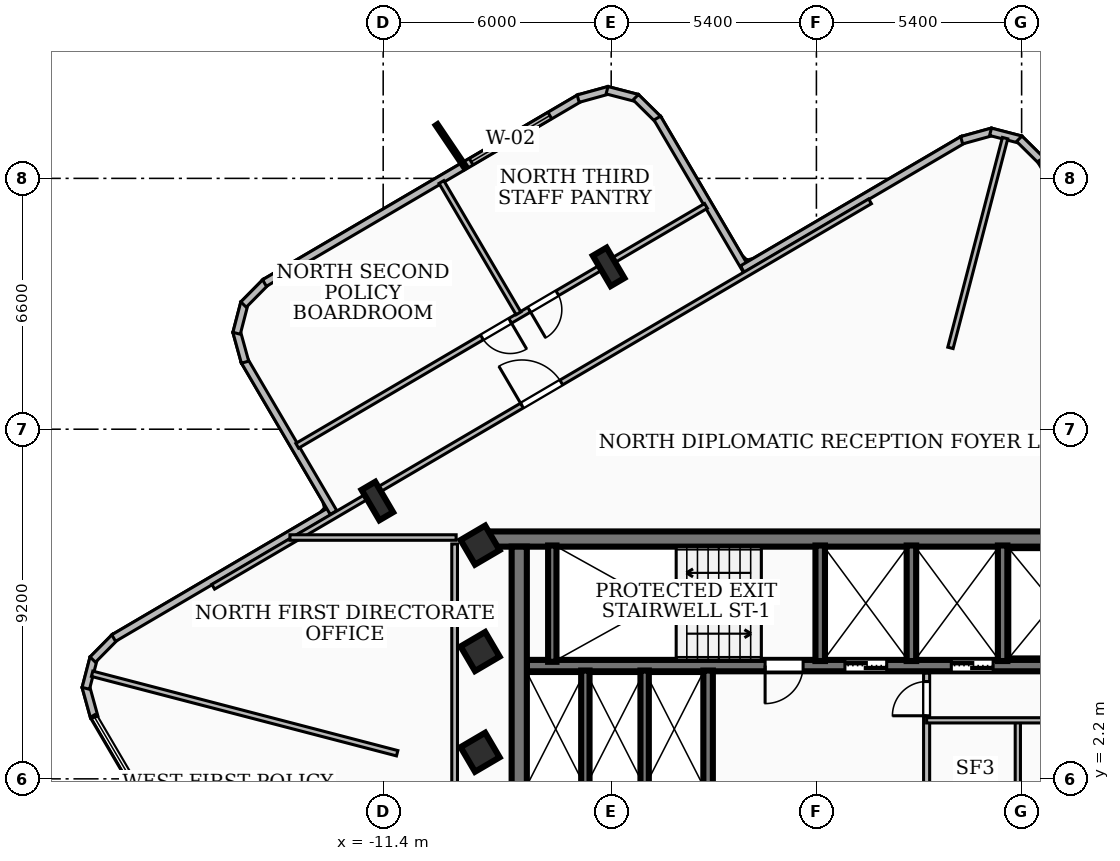
"""IFC4 building model, lengths in metres.
Left out: names, types, materials, properties, quantities, classifications, styles, units other than length and angle.
Written with IfcOpenShell. Run it as: python <this file> out.ifc"""

import sys

from ifc_helpers import new_model, si_unit, direction, frame, frame_2d, origin, origin_2d, place, context, subcontext, project, spatial, rectangle, i_section, extrude, element, fill, save


model = new_model("IFC4")
c1 = context("Model", 3, precision=1e-05, world=origin(), true_north=direction((0.0, 1.0)))
c2 = subcontext(c1, "Body", "Model", "MODEL_VIEW")
j1 = project(units=[si_unit("LENGTHUNIT", "METRE"), si_unit("PLANEANGLEUNIT", "RADIAN")], contexts=[c1])
p1 = place(None, origin())
s1 = spatial("IfcSite", under=j1, at=p1, CompositionType="ELEMENT")
p2 = place(p1, origin())
s2 = spatial("IfcBuilding", under=s1, at=p2, CompositionType="ELEMENT")
p3 = place(p2, frame((0.0, 0.0, 208.62)))
s3 = spatial("IfcBuildingStorey", under=s2, at=p3, CompositionType="ELEMENT", Elevation=208.62)
p4 = place(p3, frame((-8.78, 8.51, 0.0), z_axis=(0.0, 0.0, 1.0), x_axis=(1.0, 0.0, 0.0)))
e1 = element("IfcWall", 1, at=p4, inside=s3, PredefinedType="SHEAR", context=c2, shape_type="SweptSolid", body=[
    extrude(rectangle(XDim=17.56, YDim=0.4, at=frame_2d((8.78, 0.0))), origin(), (0.0, 0.0, 1.0), 3.16),
])
p5 = place(p3, frame((-7.82, 1.95, 0.0), z_axis=(0.0, 0.0, 1.0), x_axis=(0.0, 1.0, 0.0)))
e2 = element("IfcWall", 2, at=p5, inside=s3, PredefinedType="SHEAR", context=c2, shape_type="SweptSolid", body=[
    extrude(rectangle(XDim=6.36, YDim=0.4, at=frame_2d((3.18, 0.0))), origin(), (0.0, 0.0, 1.0), 3.16),
])
p6 = place(p3, frame((7.62, 5.18, 0.0), z_axis=(0.0, 0.0, 1.0), x_axis=(-1.0, 0.0, 0.0)))
e3 = element("IfcWall", 3, at=p6, inside=s3, PredefinedType="SOLIDWALL", context=c2, shape_type="SweptSolid", body=[
    extrude(rectangle(XDim=15.24, YDim=0.3, at=frame_2d((7.62, 0.0))), origin(), (0.0, 0.0, 1.0), 3.16),
])
p7 = place(p6, frame((5.77, 0.0, 0.0)))
e4 = element("IfcOpeningElement", 4, at=p7, cuts=e3, PredefinedType="OPENING", context=c2, shape_type="SweptSolid", body=[
    extrude(rectangle(XDim=1.1, YDim=2.15, at=frame_2d((0.55, 1.075))), frame((0.0, 0.16, 0.0), z_axis=(0.0, -1.0, 0.0), x_axis=(1.0, 0.0, 0.0)), (0.0, 0.0, 1.0), 0.32),
])
p8 = place(p6, frame((2.97, 0.0, 0.0)))
e5 = element("IfcOpeningElement", 5, at=p8, cuts=e3, PredefinedType="OPENING", context=c2, shape_type="SweptSolid", body=[
    extrude(rectangle(XDim=1.1, YDim=2.15, at=frame_2d((0.55, 1.075))), frame((0.0, 0.16, 0.0), z_axis=(0.0, -1.0, 0.0), x_axis=(1.0, 0.0, 0.0)), (0.0, 0.0, 1.0), 0.32),
])
p9 = place(p6, frame((7.97, 0.0, 0.0)))
e6 = element("IfcOpeningElement", 6, at=p9, cuts=e3, PredefinedType="OPENING", context=c2, shape_type="SweptSolid", body=[
    extrude(rectangle(XDim=1.0, YDim=2.1, at=frame_2d((0.5, 1.05))), frame((0.0, 0.16, 0.0), z_axis=(0.0, -1.0, 0.0), x_axis=(1.0, 0.0, 0.0)), (0.0, 0.0, 1.0), 0.32),
])
p10 = place(p3, frame((-6.95, 5.28, 0.0), z_axis=(0.0, 0.0, 1.0), x_axis=(0.0, 1.0, 0.0)))
e7 = element("IfcWall", 7, at=p10, inside=s3, PredefinedType="SOLIDWALL", context=c2, shape_type="SweptSolid", body=[
    extrude(rectangle(XDim=3.06, YDim=0.22, at=frame_2d((1.53, 0.0))), origin(), (0.0, 0.0, 1.0), 3.16),
])
for number, where, z_axis, x_axis in (
    (8, (0.1, 5.3, 0.0), (0.0, 0.0, 1.0), (0.0, 1.0, 0.0)),
    (9, (2.5, 5.3, 0.0), (0.0, 0.0, 1.0), (0.0, 1.0, 0.0)),
    (10, (4.9, 5.3, 0.0), (0.0, 0.0, 1.0), (0.0, 1.0, 0.0)),
):
    element("IfcWall", number, at=place(p3, frame(where, z_axis=z_axis, x_axis=x_axis)), inside=s3, PredefinedType="SOLIDWALL", context=c2, shape_type="SweptSolid", body=[
        extrude(rectangle(XDim=3.04, YDim=0.25, at=frame_2d((1.52, 0.0))), origin(), (0.0, 0.0, 1.0), 3.16),
    ])
p11 = place(p3, frame((-2.85, 1.98, 0.0), z_axis=(0.0, 0.0, 1.0), x_axis=(0.0, 1.0, 0.0)))
e11 = element("IfcWall", 11, at=p11, inside=s3, PredefinedType="SOLIDWALL", context=c2, shape_type="SweptSolid", body=[
    extrude(rectangle(XDim=3.07, YDim=0.25, at=frame_2d((1.535, 0.0))), origin(), (0.0, 0.0, 1.0), 3.16),
])
for number, where, z_axis, x_axis in (
    (12, (-6.08, 1.98, 0.0), (0.0, 0.0, 1.0), (0.0, 1.0, 0.0)),
    (13, (-4.52, 1.98, 0.0), (0.0, 0.0, 1.0), (0.0, 1.0, 0.0)),
):
    element("IfcWall", number, at=place(p3, frame(where, z_axis=z_axis, x_axis=x_axis)), inside=s3, PredefinedType="SOLIDWALL", context=c2, shape_type="SweptSolid", body=[
        extrude(rectangle(XDim=3.07, YDim=0.22, at=frame_2d((1.535, 0.0))), origin(), (0.0, 0.0, 1.0), 3.16),
    ])
for number, where, z_axis, x_axis in (
    (14, (-8.85, 2.9, 0.0), (0.0, 0.0, 1.0), (0.863, 0.506, 0.0)),
    (15, (-8.85, 5.55, 0.0), (0.0, 0.0, 1.0), (0.863, 0.506, 0.0)),
    (16, (-8.85, 8.35, 0.0), (0.0, 0.0, 1.0), (0.863, 0.506, 0.0)),
):
    element("IfcColumn", number, at=place(p3, frame(where, z_axis=z_axis, x_axis=x_axis)), inside=s3, PredefinedType="COLUMN", context=c2, shape_type="SweptSolid", body=[
        extrude(rectangle(XDim=0.75, YDim=0.75, at=origin_2d()), origin(), (0.0, 0.0, 1.0), 3.42),
    ])
for number, where, z_axis, x_axis in (
    (17, (-5.468, 15.671, 0.0), (0.0, 0.0, 1.0), (0.863, 0.506, 0.0)),
    (18, (-11.554, 9.51, 0.0), (0.0, 0.0, 1.0), (0.863, 0.506, 0.0)),
):
    element("IfcColumn", number, at=place(p3, frame(where, z_axis=z_axis, x_axis=x_axis)), inside=s3, PredefinedType="COLUMN", context=c2, shape_type="SweptSolid", body=[
        extrude(i_section(OverallWidth=0.418, OverallDepth=0.927, WebThickness=0.019, FlangeThickness=0.032, at=origin_2d()), origin(), (0.0, 0.0, 1.0), 3.42),
    ])
p12 = place(p3, frame((-19.003, 3.822, 0.0), z_axis=(0.0, 0.0, 1.0), x_axis=(-0.266246353668, 0.963905015631, 0.0)))
e19 = element("IfcWall", 19, at=p12, inside=s3, PredefinedType="SOLIDWALL", context=c2, shape_type="SweptSolid", body=[
    extrude(rectangle(XDim=0.838, YDim=0.2, at=frame_2d((0.419, 0.0))), origin(), (0.0, 0.0, 1.0), 3.16),
])
p13 = place(p3, frame((-19.225, 4.582, 0.0), z_axis=(0.0, 0.0, 1.0), x_axis=(0.251167733737, 0.967943577658, 0.0)))
e20 = element("IfcWall", 20, at=p13, inside=s3, PredefinedType="SOLIDWALL", context=c2, shape_type="SweptSolid", body=[
    extrude(rectangle(XDim=0.824, YDim=0.2, at=frame_2d((0.412, 0.0))), origin(), (0.0, 0.0, 1.0), 3.16),
])
p14 = place(p3, frame((-19.042, 5.338, 0.0), z_axis=(0.0, 0.0, 1.0), x_axis=(0.702877524881, 0.711310891957, 0.0)))
e21 = element("IfcWall", 21, at=p14, inside=s3, PredefinedType="SOLIDWALL", context=c2, shape_type="SweptSolid", body=[
    extrude(rectangle(XDim=0.84, YDim=0.2, at=frame_2d((0.42, 0.0))), origin(), (0.0, 0.0, 1.0), 3.16),
])
p15 = place(p3, frame((-18.492, 5.904, 0.0), z_axis=(0.0, 0.0, 1.0), x_axis=(0.86245977502, 0.506125613333, 0.0)))
e22 = element("IfcWall", 22, at=p15, inside=s3, PredefinedType="SOLIDWALL", context=c2, shape_type="SweptSolid", body=[
    extrude(rectangle(XDim=6.741, YDim=0.2, at=frame_2d((3.371, 0.0))), origin(), (0.0, 0.0, 1.0), 3.16),
])
p16 = place(p3, frame((-12.707, 9.207, 0.0), z_axis=(0.0, 0.0, 1.0), x_axis=(-0.505936854923, 0.862570518178, 0.0)))
e23 = element("IfcWall", 23, at=p16, inside=s3, PredefinedType="SOLIDWALL", context=c2, shape_type="SweptSolid", body=[
    extrude(rectangle(XDim=4.641, YDim=0.2, at=frame_2d((2.32, 0.0))), origin(), (0.0, 0.0, 1.0), 3.16),
])
p17 = place(p3, frame((-15.035, 13.164, 0.0), z_axis=(0.0, 0.0, 1.0), x_axis=(-0.266246353668, 0.963905015631, 0.0)))
e24 = element("IfcWall", 24, at=p17, inside=s3, PredefinedType="SOLIDWALL", context=c2, shape_type="SweptSolid", body=[
    extrude(rectangle(XDim=0.838, YDim=0.2, at=frame_2d((0.419, 0.0))), origin(), (0.0, 0.0, 1.0), 3.16),
])
p18 = place(p3, frame((-15.257, 13.924, 0.0), z_axis=(0.0, 0.0, 1.0), x_axis=(0.251167733737, 0.967943577658, 0.0)))
e25 = element("IfcWall", 25, at=p18, inside=s3, PredefinedType="SOLIDWALL", context=c2, shape_type="SweptSolid", body=[
    extrude(rectangle(XDim=0.824, YDim=0.2, at=frame_2d((0.412, 0.0))), origin(), (0.0, 0.0, 1.0), 3.16),
])
p19 = place(p3, frame((-15.074, 14.68, 0.0), z_axis=(0.0, 0.0, 1.0), x_axis=(0.702877524881, 0.711310891957, 0.0)))
e26 = element("IfcWall", 26, at=p19, inside=s3, PredefinedType="SOLIDWALL", context=c2, shape_type="SweptSolid", body=[
    extrude(rectangle(XDim=0.84, YDim=0.2, at=frame_2d((0.42, 0.0))), origin(), (0.0, 0.0, 1.0), 3.16),
])
p20 = place(p3, frame((-14.524, 15.246, 0.0), z_axis=(0.0, 0.0, 1.0), x_axis=(0.862483422861, 0.506085314241, 0.0)))
e27 = element("IfcWall", 27, at=p20, inside=s3, PredefinedType="SOLIDWALL", context=c2, shape_type="SweptSolid", body=[
    extrude(rectangle(XDim=9.625, YDim=0.2, at=frame_2d((4.812, 0.0))), origin(), (0.0, 0.0, 1.0), 3.16),
])
p21 = place(p20, frame((6.307, 0.0, 0.85)))
e28 = element("IfcOpeningElement", 28, at=p21, cuts=e27, PredefinedType="OPENING", context=c2, shape_type="SweptSolid", body=[
    extrude(rectangle(XDim=2.4, YDim=2.1, at=frame_2d((1.2, 1.05))), frame((0.0, 0.11, 0.0), z_axis=(0.0, -1.0, 0.0), x_axis=(1.0, 0.0, 0.0)), (0.0, 0.0, 1.0), 0.22),
])
p22 = place(p3, frame((-6.269, 20.097, 0.0), z_axis=(0.0, 0.0, 1.0), x_axis=(0.963925656212, 0.266171616247, 0.0)))
e29 = element("IfcWall", 29, at=p22, inside=s3, PredefinedType="SOLIDWALL", context=c2, shape_type="SweptSolid", body=[
    extrude(rectangle(XDim=0.838, YDim=0.2, at=frame_2d((0.419, 0.0))), origin(), (0.0, 0.0, 1.0), 3.16),
])
p23 = place(p3, frame((-5.509, 20.319, 0.0), z_axis=(0.0, 0.0, 1.0), x_axis=(0.967962254737, -0.251095745493, 0.0)))
e30 = element("IfcWall", 30, at=p23, inside=s3, PredefinedType="SOLIDWALL", context=c2, shape_type="SweptSolid", body=[
    extrude(rectangle(XDim=0.824, YDim=0.2, at=frame_2d((0.412, 0.0))), origin(), (0.0, 0.0, 1.0), 3.16),
])
p24 = place(p3, frame((-4.753, 20.136, 0.0), z_axis=(0.0, 0.0, 1.0), x_axis=(0.711167178618, -0.70302293281, 0.0)))
e31 = element("IfcWall", 31, at=p24, inside=s3, PredefinedType="SOLIDWALL", context=c2, shape_type="SweptSolid", body=[
    extrude(rectangle(XDim=0.839, YDim=0.2, at=frame_2d((0.42, 0.0))), origin(), (0.0, 0.0, 1.0), 3.16),
])
p25 = place(p3, frame((-4.187, 19.586, 0.0), z_axis=(0.0, 0.0, 1.0), x_axis=(0.505936854923, -0.862570518178, 0.0)))
e32 = element("IfcWall", 32, at=p25, inside=s3, PredefinedType="SOLIDWALL", context=c2, shape_type="SweptSolid", body=[
    extrude(rectangle(XDim=4.641, YDim=0.2, at=frame_2d((2.32, 0.0))), origin(), (0.0, 0.0, 1.0), 3.16),
])
p26 = place(p3, frame((-1.948, 15.612, 0.0), z_axis=(0.0, 0.0, 1.0), x_axis=(0.86259717351, 0.505891407569, 0.0)))
e33 = element("IfcWall", 33, at=p26, inside=s3, PredefinedType="SOLIDWALL", context=c2, shape_type="SweptSolid", body=[
    extrude(rectangle(XDim=6.742, YDim=0.2, at=frame_2d((3.371, 0.0))), origin(), (0.0, 0.0, 1.0), 3.16),
])
p27 = place(p3, frame((3.822, 19.003, 0.0), z_axis=(0.0, 0.0, 1.0), x_axis=(0.963905015631, 0.266246353668, 0.0)))
e34 = element("IfcWall", 34, at=p27, inside=s3, PredefinedType="SOLIDWALL", context=c2, shape_type="SweptSolid", body=[
    extrude(rectangle(XDim=0.838, YDim=0.2, at=frame_2d((0.419, 0.0))), origin(), (0.0, 0.0, 1.0), 3.16),
])
p28 = place(p3, frame((4.582, 19.225, 0.0), z_axis=(0.0, 0.0, 1.0), x_axis=(0.967943577658, -0.251167733737, 0.0)))
e35 = element("IfcWall", 35, at=p28, inside=s3, PredefinedType="SOLIDWALL", context=c2, shape_type="SweptSolid", body=[
    extrude(rectangle(XDim=0.824, YDim=0.2, at=frame_2d((0.412, 0.0))), origin(), (0.0, 0.0, 1.0), 3.16),
])
p29 = place(p3, frame((5.338, 19.042, 0.0), z_axis=(0.0, 0.0, 1.0), x_axis=(0.711310891957, -0.702877524881, 0.0)))
e36 = element("IfcWall", 36, at=p29, inside=s3, PredefinedType="SOLIDWALL", context=c2, shape_type="SweptSolid", body=[
    extrude(rectangle(XDim=0.84, YDim=0.2, at=frame_2d((0.42, 0.0))), origin(), (0.0, 0.0, 1.0), 3.16),
])
p30 = place(p3, frame((5.904, 18.492, 0.0), z_axis=(0.0, 0.0, 1.0), x_axis=(0.506017844805, -0.862523008817, 0.0)))
e37 = element("IfcWall", 37, at=p30, inside=s3, PredefinedType="SOLIDWALL", context=c2, shape_type="SweptSolid", body=[
    extrude(rectangle(XDim=6.741, YDim=0.2, at=frame_2d((3.37, 0.0))), origin(), (0.0, 0.0, 1.0), 3.16),
])
p31 = place(p3, frame((2.9, 2.04, 0.0), z_axis=(0.0, 0.0, 1.0), x_axis=(0.0, 1.0, 0.0)))
e38 = element("IfcWall", 38, at=p31, inside=s3, PredefinedType="PARTITIONING", context=c2, shape_type="SweptSolid", body=[
    extrude(rectangle(XDim=2.94, YDim=0.16, at=frame_2d((1.47, 0.0))), origin(), (0.0, 0.0, 1.0), 2.39),
])
p32 = place(p31, frame((1.82, 0.0, 0.0)))
e39 = element("IfcOpeningElement", 39, at=p32, cuts=e38, PredefinedType="OPENING", context=c2, shape_type="SweptSolid", body=[
    extrude(rectangle(XDim=0.9, YDim=2.06, at=frame_2d((0.45, 1.03))), frame((0.0, 0.09, 0.0), z_axis=(0.0, -1.0, 0.0), x_axis=(1.0, 0.0, 0.0)), (0.0, 0.0, 1.0), 0.18),
])
p33 = place(p3, frame((2.9, 3.74, 0.0), z_axis=(0.0, 0.0, 1.0), x_axis=(1.0, 0.0, 0.0)))
e40 = element("IfcWall", 40, at=p33, inside=s3, PredefinedType="PARTITIONING", context=c2, shape_type="SweptSolid", body=[
    extrude(rectangle(XDim=4.65, YDim=0.138, at=frame_2d((2.325, 0.0))), origin(), (0.0, 0.0, 1.0), 3.16),
])
p34 = place(p3, frame((5.3, 1.85, 0.0), z_axis=(0.0, 0.0, 1.0), x_axis=(0.0, 1.0, 0.0)))
e41 = element("IfcWall", 41, at=p34, inside=s3, PredefinedType="PARTITIONING", context=c2, shape_type="SweptSolid", body=[
    extrude(rectangle(XDim=1.89, YDim=0.138, at=frame_2d((0.945, 0.0))), origin(), (0.0, 0.0, 1.0), 2.39),
])
p35 = place(p3, frame((-9.52, 1.75, 0.0), z_axis=(0.0, 0.0, 1.0), x_axis=(0.0, 1.0, 0.0)))
e42 = element("IfcWall", 42, at=p35, inside=s3, PredefinedType="PARTITIONING", context=c2, shape_type="SweptSolid", body=[
    extrude(rectangle(XDim=6.63, YDim=0.15, at=frame_2d((3.315, 0.0))), origin(), (0.0, 0.0, 1.0), 3.16),
])
p36 = place(p3, frame((-13.854, 8.55, 0.0), z_axis=(0.0, 0.0, 1.0), x_axis=(1.0, 0.0, 0.0)))
e43 = element("IfcWall", 43, at=p36, inside=s3, PredefinedType="PARTITIONING", context=c2, shape_type="SweptSolid", body=[
    extrude(rectangle(XDim=4.374, YDim=0.145, at=frame_2d((2.187, 0.0))), origin(), (0.0, 0.0, 1.0), 2.53),
])
p37 = place(p3, frame((3.527, 13.54, 0.0), z_axis=(0.0, 0.0, 1.0), x_axis=(0.252132617321, 0.967692690519, 0.0)))
e44 = element("IfcWall", 44, at=p37, inside=s3, PredefinedType="PARTITIONING", context=c2, shape_type="SweptSolid", body=[
    extrude(rectangle(XDim=5.703, YDim=0.145, at=frame_2d((2.852, 0.0))), origin(), (0.0, 0.0, 1.0), 3.16),
])
p38 = place(p3, frame((-11.032, 2.874, 0.0), z_axis=(0.0, 0.0, 1.0), x_axis=(-0.967704417597, 0.252087604146, 0.0)))
e45 = element("IfcWall", 45, at=p38, inside=s3, PredefinedType="PARTITIONING", context=c2, shape_type="SweptSolid", body=[
    extrude(rectangle(XDim=8.295, YDim=0.145, at=frame_2d((4.147, 0.0))), origin(), (0.0, 0.0, 1.0), 3.16),
])
p39 = place(p3, frame((-15.873, 7.255, 0.0), z_axis=(0.0, 0.0, 1.0), x_axis=(0.862498672631, 0.506059324299, 0.0)))
e46 = element("IfcWall", 46, at=p39, inside=s3, PredefinedType="PARTITIONING", context=c2, shape_type="SweptSolid", body=[
    extrude(rectangle(XDim=20.039, YDim=0.145, at=frame_2d((10.02, 0.0))), origin(), (0.0, 0.0, 1.0), 2.53),
])
p40 = place(p39, frame((9.42, 0.0, 0.0)))
e47 = element("IfcOpeningElement", 47, at=p40, cuts=e46, PredefinedType="OPENING", context=c2, shape_type="SweptSolid", body=[
    extrude(rectangle(XDim=1.2, YDim=2.1, at=frame_2d((0.6, 1.05))), frame((0.0, 0.083, 0.0), z_axis=(0.0, -1.0, 0.0), x_axis=(1.0, 0.0, 0.0)), (0.0, 0.0, 1.0), 0.165),
])
p41 = place(p3, frame((-7.84, 14.449, 0.0), z_axis=(0.0, 0.0, 1.0), x_axis=(-0.505991637753, 0.862538383218, 0.0)))
e48 = element("IfcWall", 48, at=p41, inside=s3, PredefinedType="PARTITIONING", context=c2, shape_type="SweptSolid", body=[
    extrude(rectangle(XDim=4.006, YDim=0.145, at=frame_2d((2.003, 0.0))), origin(), (0.0, 0.0, 1.0), 3.16),
])
p42 = place(p3, frame((-2.906, 17.275, 0.0), z_axis=(0.0, 0.0, 1.0), x_axis=(-0.862505879614, -0.506047040927, 0.0)))
e49 = element("IfcWall", 49, at=p42, inside=s3, PredefinedType="PARTITIONING", context=c2, shape_type="SweptSolid", body=[
    extrude(rectangle(XDim=12.471, YDim=0.145, at=frame_2d((6.235, 0.0))), origin(), (0.0, 0.0, 1.0), 2.53),
])
p43 = place(p42, frame((4.535, 0.0, 0.0)))
e50 = element("IfcOpeningElement", 50, at=p43, cuts=e49, PredefinedType="OPENING", context=c2, shape_type="SweptSolid", body=[
    extrude(rectangle(XDim=0.86, YDim=2.04, at=frame_2d((0.43, 1.02))), frame((0.0, 0.083, 0.0), z_axis=(0.0, -1.0, 0.0), x_axis=(1.0, 0.0, 0.0)), (0.0, 0.0, 1.0), 0.165),
])
p44 = place(p42, frame((5.975, 0.0, 0.0)))
e51 = element("IfcOpeningElement", 51, at=p44, cuts=e49, PredefinedType="OPENING", context=c2, shape_type="SweptSolid", body=[
    extrude(rectangle(XDim=0.86, YDim=2.04, at=frame_2d((0.43, 1.02))), frame((0.0, 0.083, 0.0), z_axis=(0.0, -1.0, 0.0), x_axis=(1.0, 0.0, 0.0)), (0.0, 0.0, 1.0), 0.165),
])
p45 = place(p21, origin())
e52 = element("IfcWindow", 52, at=p45, inside=s3, PartitioningType="SINGLE_PANEL", PredefinedType="WINDOW", context=c2, shape_type="SweptSolid", body=[
    extrude(rectangle(XDim=2.4, YDim=2.1, at=frame_2d((1.2, 1.05))), frame((0.0, 0.03, 0.0), z_axis=(0.0, -1.0, 0.0), x_axis=(1.0, 0.0, 0.0)), (0.0, 0.0, 1.0), 0.06),
])
fill(e28, e52)
p46 = place(p7, origin())
e53 = element("IfcDoor", 53, at=p46, inside=s3, OperationType="DOUBLE_DOOR_SLIDING", PredefinedType="DOOR", context=c2, shape_type="SweptSolid", body=[
    extrude(rectangle(XDim=1.1, YDim=2.15, at=frame_2d((0.55, 1.075))), frame((0.0, 0.025, 0.0), z_axis=(0.0, -1.0, 0.0), x_axis=(1.0, 0.0, 0.0)), (0.0, 0.0, 1.0), 0.05),
])
fill(e4, e53)
p47 = place(p8, origin())
e54 = element("IfcDoor", 54, at=p47, inside=s3, OperationType="DOUBLE_DOOR_SLIDING", PredefinedType="DOOR", context=c2, shape_type="SweptSolid", body=[
    extrude(rectangle(XDim=1.1, YDim=2.15, at=frame_2d((0.55, 1.075))), frame((0.0, 0.025, 0.0), z_axis=(0.0, -1.0, 0.0), x_axis=(1.0, 0.0, 0.0)), (0.0, 0.0, 1.0), 0.05),
])
fill(e5, e54)
p48 = place(p9, origin())
e55 = element("IfcDoor", 55, at=p48, inside=s3, OperationType="SINGLE_SWING_RIGHT", PredefinedType="DOOR", context=c2, shape_type="SweptSolid", body=[
    extrude(rectangle(XDim=1.0, YDim=2.1, at=frame_2d((0.5, 1.05))), frame((0.0, 0.025, 0.0), z_axis=(0.0, -1.0, 0.0), x_axis=(1.0, 0.0, 0.0)), (0.0, 0.0, 1.0), 0.05),
])
fill(e6, e55)
p49 = place(p32, origin())
e56 = element("IfcDoor", 56, at=p49, inside=s3, OperationType="SINGLE_SWING_LEFT", PredefinedType="DOOR", context=c2, shape_type="SweptSolid", body=[
    extrude(rectangle(XDim=0.9, YDim=2.06, at=frame_2d((0.45, 1.03))), frame((0.0, 0.025, 0.0), z_axis=(0.0, -1.0, 0.0), x_axis=(1.0, 0.0, 0.0)), (0.0, 0.0, 1.0), 0.05),
])
fill(e39, e56)
p50 = place(p40, origin())
e57 = element("IfcDoor", 57, at=p50, inside=s3, OperationType="SINGLE_SWING_LEFT", PredefinedType="DOOR", context=c2, shape_type="SweptSolid", body=[
    extrude(rectangle(XDim=1.2, YDim=2.1, at=frame_2d((0.6, 1.05))), frame((0.0, 0.025, 0.0), z_axis=(0.0, -1.0, 0.0), x_axis=(1.0, 0.0, 0.0)), (0.0, 0.0, 1.0), 0.05),
])
fill(e47, e57)
p51 = place(p43, origin())
e58 = element("IfcDoor", 58, at=p51, inside=s3, OperationType="SINGLE_SWING_RIGHT", PredefinedType="DOOR", context=c2, shape_type="SweptSolid", body=[
    extrude(rectangle(XDim=0.86, YDim=2.04, at=frame_2d((0.43, 1.02))), frame((0.0, 0.025, 0.0), z_axis=(0.0, -1.0, 0.0), x_axis=(1.0, 0.0, 0.0)), (0.0, 0.0, 1.0), 0.05),
])
fill(e50, e58)
p52 = place(p44, origin())
e59 = element("IfcDoor", 59, at=p52, inside=s3, OperationType="SINGLE_SWING_LEFT", PredefinedType="DOOR", context=c2, shape_type="SweptSolid", body=[
    extrude(rectangle(XDim=0.86, YDim=2.04, at=frame_2d((0.43, 1.02))), frame((0.0, 0.025, 0.0), z_axis=(0.0, -1.0, 0.0), x_axis=(1.0, 0.0, 0.0)), (0.0, 0.0, 1.0), 0.05),
])
fill(e51, e59)
save(model, sys.argv[1])
